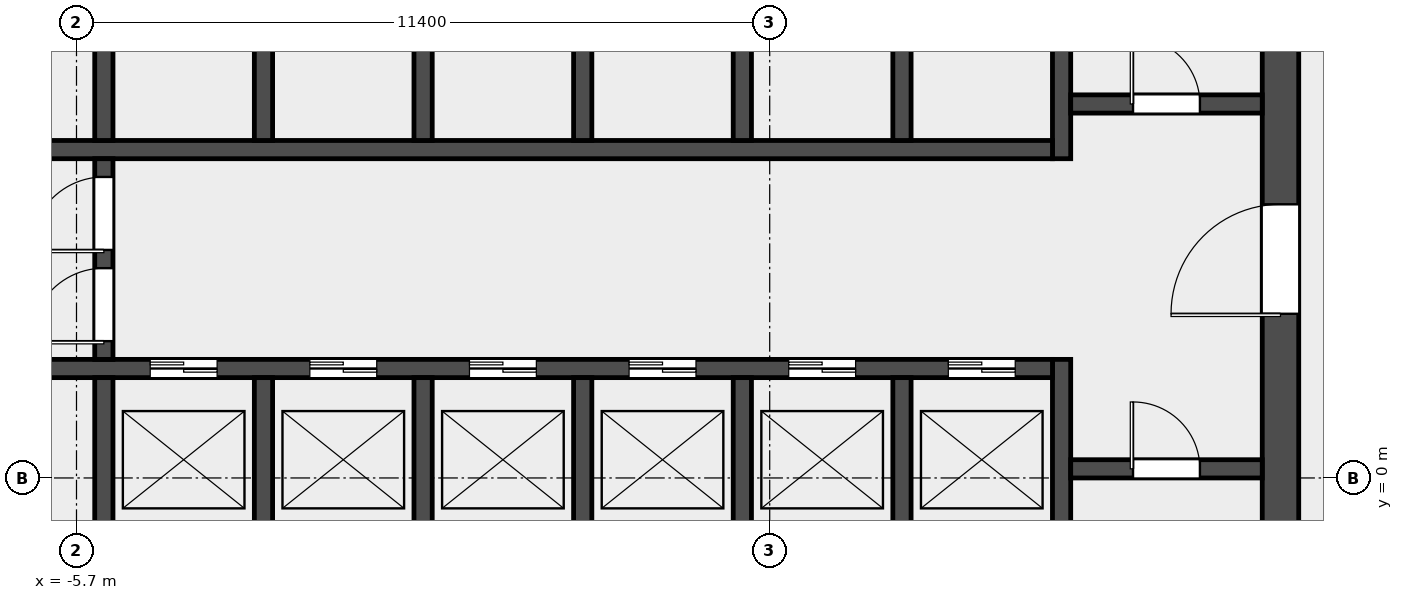
"""IFC4 building model, lengths in metres.
Left out: names, types, materials, properties, quantities, classifications, styles, units other than length and angle.
Written with IfcOpenShell. Run it as: python <this file> out.ifc"""

import sys

from ifc_helpers import new_model, si_unit, direction, frame, frame_2d, origin, place, context, subcontext, project, spatial, rectangle, extrude, element, fill, save


model = new_model("IFC4")
c1 = context("Model", 3, precision=1e-05, world=origin(), true_north=direction((0.0, 1.0)))
c2 = subcontext(c1, "Body", "Model", "MODEL_VIEW")
j1 = project(units=[si_unit("LENGTHUNIT", "METRE"), si_unit("PLANEANGLEUNIT", "RADIAN")], contexts=[c1])
p1 = place(None, origin())
s1 = spatial("IfcSite", under=j1, at=p1, CompositionType="ELEMENT")
p2 = place(p1, origin())
s2 = spatial("IfcBuilding", under=s1, at=p2, CompositionType="ELEMENT")
p3 = place(p2, frame((0.0, 0.0, 79.0)))
s3 = spatial("IfcBuildingStorey", under=s2, at=p3, CompositionType="ELEMENT", Elevation=79.0)
p4 = place(p3, frame((14.1, -6.6, 0.0), z_axis=(0.0, 0.0, 1.0), x_axis=(0.0, 1.0, 0.0)))
e1 = element("IfcWall", 1, at=p4, inside=s3, PredefinedType="SHEAR", context=c2, shape_type="SweptSolid", body=[
    extrude(rectangle(XDim=19.5, YDim=0.6, at=frame_2d((9.75, 0.0))), origin(), (0.0, 0.0, 1.0), 4.5),
])
p5 = place(p4, frame((9.3, 0.0, 0.0)))
e2 = element("IfcOpeningElement", 2, at=p5, cuts=e1, PredefinedType="OPENING", context=c2, shape_type="SweptSolid", body=[
    extrude(rectangle(XDim=1.8, YDim=2.1, at=frame_2d((0.9, 1.05))), frame((0.0, 0.312, 0.0), z_axis=(0.0, -1.0, 0.0), x_axis=(1.0, 0.0, 0.0)), (0.0, 0.0, 1.0), 0.624),
])
p6 = place(p3, frame((10.5, -6.6, 0.0), z_axis=(0.0, 0.0, 1.0), x_axis=(0.0, 1.0, 0.0)))
e3 = element("IfcWall", 3, at=p6, inside=s3, PredefinedType="SHEAR", context=c2, shape_type="SweptSolid", body=[
    extrude(rectangle(XDim=8.55, YDim=0.3, at=frame_2d((4.275, 0.0))), origin(), (0.0, 0.0, 1.0), 4.5),
])
p7 = place(p3, frame((10.5, 5.25, 0.0), z_axis=(0.0, 0.0, 1.0), x_axis=(0.0, 1.0, 0.0)))
e4 = element("IfcWall", 4, at=p7, inside=s3, PredefinedType="SHEAR", context=c2, shape_type="SweptSolid", body=[
    extrude(rectangle(XDim=7.65, YDim=0.3, at=frame_2d((3.825, 0.0))), origin(), (0.0, 0.0, 1.0), 4.5),
])
p8 = place(p3, frame((10.65, 0.15, 0.0), z_axis=(0.0, 0.0, 1.0), x_axis=(1.0, 0.0, 0.0)))
e5 = element("IfcWall", 5, at=p8, inside=s3, PredefinedType="SOLIDWALL", context=c2, shape_type="SweptSolid", body=[
    extrude(rectangle(XDim=3.15, YDim=0.3, at=frame_2d((1.575, 0.0))), origin(), (0.0, 0.0, 1.0), 4.5),
])
p9 = place(p8, frame((1.025, 0.0, 0.0)))
e6 = element("IfcOpeningElement", 6, at=p9, cuts=e5, PredefinedType="OPENING", context=c2, shape_type="SweptSolid", body=[
    extrude(rectangle(XDim=1.1, YDim=2.1, at=frame_2d((0.55, 1.05))), frame((0.0, 0.162, 0.0), z_axis=(0.0, -1.0, 0.0), x_axis=(1.0, 0.0, 0.0)), (0.0, 0.0, 1.0), 0.324),
])
p10 = place(p3, frame((10.65, 6.15, 0.0), z_axis=(0.0, 0.0, 1.0), x_axis=(1.0, 0.0, 0.0)))
e7 = element("IfcWall", 7, at=p10, inside=s3, PredefinedType="SOLIDWALL", context=c2, shape_type="SweptSolid", body=[
    extrude(rectangle(XDim=3.15, YDim=0.3, at=frame_2d((1.575, 0.0))), origin(), (0.0, 0.0, 1.0), 4.5),
])
p11 = place(p10, frame((1.025, 0.0, 0.0)))
e8 = element("IfcOpeningElement", 8, at=p11, cuts=e7, PredefinedType="OPENING", context=c2, shape_type="SweptSolid", body=[
    extrude(rectangle(XDim=1.1, YDim=2.1, at=frame_2d((0.55, 1.05))), frame((0.0, 0.162, 0.0), z_axis=(0.0, -1.0, 0.0), x_axis=(1.0, 0.0, 0.0)), (0.0, 0.0, 1.0), 0.324),
])
p12 = place(p3, frame((-10.35, 1.8, 0.0), z_axis=(0.0, 0.0, 1.0), x_axis=(1.0, 0.0, 0.0)))
e9 = element("IfcWall", 9, at=p12, inside=s3, PredefinedType="SOLIDWALL", context=c2, shape_type="SweptSolid", body=[
    extrude(rectangle(XDim=20.7, YDim=0.3, at=frame_2d((10.35, 0.0))), origin(), (0.0, 0.0, 1.0), 4.5),
])
p13 = place(p12, frame((0.512, 0.0, 0.0)))
e10 = element("IfcOpeningElement", 10, at=p13, cuts=e9, PredefinedType="OPENING", context=c2, shape_type="SweptSolid", body=[
    extrude(rectangle(XDim=1.3, YDim=2.1, at=frame_2d((0.65, 1.05))), frame((0.0, 0.162, 0.0), z_axis=(0.0, -1.0, 0.0), x_axis=(1.0, 0.0, 0.0)), (0.0, 0.0, 1.0), 0.324),
])
p14 = place(p12, frame((5.863, 0.0, 0.0)))
e11 = element("IfcOpeningElement", 11, at=p14, cuts=e9, PredefinedType="OPENING", context=c2, shape_type="SweptSolid", body=[
    extrude(rectangle(XDim=1.1, YDim=2.1, at=frame_2d((0.55, 1.05))), frame((0.0, 0.162, 0.0), z_axis=(0.0, -1.0, 0.0), x_axis=(1.0, 0.0, 0.0)), (0.0, 0.0, 1.0), 0.324),
])
p15 = place(p12, frame((8.488, 0.0, 0.0)))
e12 = element("IfcOpeningElement", 12, at=p15, cuts=e9, PredefinedType="OPENING", context=c2, shape_type="SweptSolid", body=[
    extrude(rectangle(XDim=1.1, YDim=2.1, at=frame_2d((0.55, 1.05))), frame((0.0, 0.162, 0.0), z_axis=(0.0, -1.0, 0.0), x_axis=(1.0, 0.0, 0.0)), (0.0, 0.0, 1.0), 0.324),
])
p16 = place(p12, frame((11.113, 0.0, 0.0)))
e13 = element("IfcOpeningElement", 13, at=p16, cuts=e9, PredefinedType="OPENING", context=c2, shape_type="SweptSolid", body=[
    extrude(rectangle(XDim=1.1, YDim=2.1, at=frame_2d((0.55, 1.05))), frame((0.0, 0.162, 0.0), z_axis=(0.0, -1.0, 0.0), x_axis=(1.0, 0.0, 0.0)), (0.0, 0.0, 1.0), 0.324),
])
p17 = place(p12, frame((13.738, 0.0, 0.0)))
e14 = element("IfcOpeningElement", 14, at=p17, cuts=e9, PredefinedType="OPENING", context=c2, shape_type="SweptSolid", body=[
    extrude(rectangle(XDim=1.1, YDim=2.1, at=frame_2d((0.55, 1.05))), frame((0.0, 0.162, 0.0), z_axis=(0.0, -1.0, 0.0), x_axis=(1.0, 0.0, 0.0)), (0.0, 0.0, 1.0), 0.324),
])
p18 = place(p12, frame((16.363, 0.0, 0.0)))
e15 = element("IfcOpeningElement", 15, at=p18, cuts=e9, PredefinedType="OPENING", context=c2, shape_type="SweptSolid", body=[
    extrude(rectangle(XDim=1.1, YDim=2.1, at=frame_2d((0.55, 1.05))), frame((0.0, 0.162, 0.0), z_axis=(0.0, -1.0, 0.0), x_axis=(1.0, 0.0, 0.0)), (0.0, 0.0, 1.0), 0.324),
])
p19 = place(p12, frame((18.988, 0.0, 0.0)))
e16 = element("IfcOpeningElement", 16, at=p19, cuts=e9, PredefinedType="OPENING", context=c2, shape_type="SweptSolid", body=[
    extrude(rectangle(XDim=1.1, YDim=2.1, at=frame_2d((0.55, 1.05))), frame((0.0, 0.162, 0.0), z_axis=(0.0, -1.0, 0.0), x_axis=(1.0, 0.0, 0.0)), (0.0, 0.0, 1.0), 0.324),
])
p20 = place(p3, frame((-10.35, 5.4, 0.0), z_axis=(0.0, 0.0, 1.0), x_axis=(1.0, 0.0, 0.0)))
e17 = element("IfcWall", 17, at=p20, inside=s3, PredefinedType="SOLIDWALL", context=c2, shape_type="SweptSolid", body=[
    extrude(rectangle(XDim=20.7, YDim=0.3, at=frame_2d((10.35, 0.0))), origin(), (0.0, 0.0, 1.0), 4.5),
])
p21 = place(p20, frame((0.512, 0.0, 0.0)))
e18 = element("IfcOpeningElement", 18, at=p21, cuts=e17, PredefinedType="OPENING", context=c2, shape_type="SweptSolid", body=[
    extrude(rectangle(XDim=1.3, YDim=2.1, at=frame_2d((0.65, 1.05))), frame((0.0, 0.162, 0.0), z_axis=(0.0, -1.0, 0.0), x_axis=(1.0, 0.0, 0.0)), (0.0, 0.0, 1.0), 0.324),
])
for number, where, z_axis, x_axis in (
    (19, (-5.25, -1.05, 0.0), (0.0, 0.0, 1.0), (0.0, 1.0, 0.0)),
    (20, (-2.625, -1.05, 0.0), (0.0, 0.0, 1.0), (0.0, 1.0, 0.0)),
    (21, (0.0, -1.05, 0.0), (0.0, 0.0, 1.0), (0.0, 1.0, 0.0)),
    (22, (2.625, -1.05, 0.0), (0.0, 0.0, 1.0), (0.0, 1.0, 0.0)),
    (23, (5.25, -1.05, 0.0), (0.0, 0.0, 1.0), (0.0, 1.0, 0.0)),
    (24, (7.875, -1.05, 0.0), (0.0, 0.0, 1.0), (0.0, 1.0, 0.0)),
    (25, (-5.25, 5.55, 0.0), (0.0, 0.0, 1.0), (0.0, 1.0, 0.0)),
    (26, (-2.625, 5.55, 0.0), (0.0, 0.0, 1.0), (0.0, 1.0, 0.0)),
    (27, (0.0, 5.55, 0.0), (0.0, 0.0, 1.0), (0.0, 1.0, 0.0)),
    (28, (2.625, 5.55, 0.0), (0.0, 0.0, 1.0), (0.0, 1.0, 0.0)),
    (29, (5.25, 5.55, 0.0), (0.0, 0.0, 1.0), (0.0, 1.0, 0.0)),
    (30, (7.875, 5.55, 0.0), (0.0, 0.0, 1.0), (0.0, 1.0, 0.0)),
):
    element("IfcWall", number, at=place(p3, frame(where, z_axis=z_axis, x_axis=x_axis)), inside=s3, PredefinedType="SOLIDWALL", context=c2, shape_type="SweptSolid", body=[
        extrude(rectangle(XDim=2.7, YDim=0.3, at=frame_2d((1.35, 0.0))), origin(), (0.0, 0.0, 1.0), 4.5),
    ])
p22 = place(p3, frame((-5.25, 1.95, 0.0), z_axis=(0.0, 0.0, 1.0), x_axis=(0.0, 1.0, 0.0)))
e31 = element("IfcWall", 31, at=p22, inside=s3, PredefinedType="SOLIDWALL", context=c2, shape_type="SweptSolid", body=[
    extrude(rectangle(XDim=3.3, YDim=0.3, at=frame_2d((1.65, 0.0))), origin(), (0.0, 0.0, 1.0), 4.5),
])
p23 = place(p22, frame((0.3, 0.0, 0.0)))
e32 = element("IfcOpeningElement", 32, at=p23, cuts=e31, PredefinedType="OPENING", context=c2, shape_type="SweptSolid", body=[
    extrude(rectangle(XDim=1.2, YDim=2.1, at=frame_2d((0.6, 1.05))), frame((0.0, 0.162, 0.0), z_axis=(0.0, -1.0, 0.0), x_axis=(1.0, 0.0, 0.0)), (0.0, 0.0, 1.0), 0.324),
])
p24 = place(p22, frame((1.8, 0.0, 0.0)))
e33 = element("IfcOpeningElement", 33, at=p24, cuts=e31, PredefinedType="OPENING", context=c2, shape_type="SweptSolid", body=[
    extrude(rectangle(XDim=1.2, YDim=2.1, at=frame_2d((0.6, 1.05))), frame((0.0, 0.162, 0.0), z_axis=(0.0, -1.0, 0.0), x_axis=(1.0, 0.0, 0.0)), (0.0, 0.0, 1.0), 0.324),
])
p25 = place(p9, origin())
e34 = element("IfcDoor", 34, at=p25, inside=s3, OperationType="SINGLE_SWING_RIGHT", PredefinedType="DOOR", context=c2, shape_type="SweptSolid", body=[
    extrude(rectangle(XDim=1.1, YDim=2.1, at=frame_2d((0.55, 1.05))), frame((0.0, 0.025, 0.0), z_axis=(0.0, -1.0, 0.0), x_axis=(1.0, 0.0, 0.0)), (0.0, 0.0, 1.0), 0.05),
])
fill(e6, e34)
p26 = place(p11, origin())
e35 = element("IfcDoor", 35, at=p26, inside=s3, OperationType="SINGLE_SWING_RIGHT", PredefinedType="DOOR", context=c2, shape_type="SweptSolid", body=[
    extrude(rectangle(XDim=1.1, YDim=2.1, at=frame_2d((0.55, 1.05))), frame((0.0, 0.025, 0.0), z_axis=(0.0, -1.0, 0.0), x_axis=(1.0, 0.0, 0.0)), (0.0, 0.0, 1.0), 0.05),
])
fill(e8, e35)
p27 = place(p5, origin())
e36 = element("IfcDoor", 36, at=p27, inside=s3, OperationType="DOUBLE_DOOR_SINGLE_SWING", PredefinedType="DOOR", context=c2, shape_type="SweptSolid", body=[
    extrude(rectangle(XDim=1.8, YDim=2.1, at=frame_2d((0.9, 1.05))), frame((0.0, 0.025, 0.0), z_axis=(0.0, -1.0, 0.0), x_axis=(1.0, 0.0, 0.0)), (0.0, 0.0, 1.0), 0.05),
])
fill(e2, e36)
p28 = place(p23, origin())
e37 = element("IfcDoor", 37, at=p28, inside=s3, OperationType="SINGLE_SWING_LEFT", PredefinedType="DOOR", context=c2, shape_type="SweptSolid", body=[
    extrude(rectangle(XDim=1.2, YDim=2.1, at=frame_2d((0.6, 1.05))), frame((0.0, 0.025, 0.0), z_axis=(0.0, -1.0, 0.0), x_axis=(1.0, 0.0, 0.0)), (0.0, 0.0, 1.0), 0.05),
])
fill(e32, e37)
p29 = place(p24, origin())
e38 = element("IfcDoor", 38, at=p29, inside=s3, OperationType="SINGLE_SWING_RIGHT", PredefinedType="DOOR", context=c2, shape_type="SweptSolid", body=[
    extrude(rectangle(XDim=1.2, YDim=2.1, at=frame_2d((0.6, 1.05))), frame((0.0, 0.025, 0.0), z_axis=(0.0, -1.0, 0.0), x_axis=(1.0, 0.0, 0.0)), (0.0, 0.0, 1.0), 0.05),
])
fill(e33, e38)
p30 = place(p14, origin())
e39 = element("IfcDoor", 39, at=p30, inside=s3, OperationType="DOUBLE_DOOR_SLIDING", PredefinedType="DOOR", context=c2, shape_type="SweptSolid", body=[
    extrude(rectangle(XDim=1.1, YDim=2.1, at=frame_2d((0.55, 1.05))), frame((0.0, 0.025, 0.0), z_axis=(0.0, -1.0, 0.0), x_axis=(1.0, 0.0, 0.0)), (0.0, 0.0, 1.0), 0.05),
])
fill(e11, e39)
p31 = place(p15, origin())
e40 = element("IfcDoor", 40, at=p31, inside=s3, OperationType="DOUBLE_DOOR_SLIDING", PredefinedType="DOOR", context=c2, shape_type="SweptSolid", body=[
    extrude(rectangle(XDim=1.1, YDim=2.1, at=frame_2d((0.55, 1.05))), frame((0.0, 0.025, 0.0), z_axis=(0.0, -1.0, 0.0), x_axis=(1.0, 0.0, 0.0)), (0.0, 0.0, 1.0), 0.05),
])
fill(e12, e40)
p32 = place(p16, origin())
e41 = element("IfcDoor", 41, at=p32, inside=s3, OperationType="DOUBLE_DOOR_SLIDING", PredefinedType="DOOR", context=c2, shape_type="SweptSolid", body=[
    extrude(rectangle(XDim=1.1, YDim=2.1, at=frame_2d((0.55, 1.05))), frame((0.0, 0.025, 0.0), z_axis=(0.0, -1.0, 0.0), x_axis=(1.0, 0.0, 0.0)), (0.0, 0.0, 1.0), 0.05),
])
fill(e13, e41)
p33 = place(p17, origin())
e42 = element("IfcDoor", 42, at=p33, inside=s3, OperationType="DOUBLE_DOOR_SLIDING", PredefinedType="DOOR", context=c2, shape_type="SweptSolid", body=[
    extrude(rectangle(XDim=1.1, YDim=2.1, at=frame_2d((0.55, 1.05))), frame((0.0, 0.025, 0.0), z_axis=(0.0, -1.0, 0.0), x_axis=(1.0, 0.0, 0.0)), (0.0, 0.0, 1.0), 0.05),
])
fill(e14, e42)
p34 = place(p18, origin())
e43 = element("IfcDoor", 43, at=p34, inside=s3, OperationType="DOUBLE_DOOR_SLIDING", PredefinedType="DOOR", context=c2, shape_type="SweptSolid", body=[
    extrude(rectangle(XDim=1.1, YDim=2.1, at=frame_2d((0.55, 1.05))), frame((0.0, 0.025, 0.0), z_axis=(0.0, -1.0, 0.0), x_axis=(1.0, 0.0, 0.0)), (0.0, 0.0, 1.0), 0.05),
])
fill(e15, e43)
p35 = place(p19, origin())
e44 = element("IfcDoor", 44, at=p35, inside=s3, OperationType="DOUBLE_DOOR_SLIDING", PredefinedType="DOOR", context=c2, shape_type="SweptSolid", body=[
    extrude(rectangle(XDim=1.1, YDim=2.1, at=frame_2d((0.55, 1.05))), frame((0.0, 0.025, 0.0), z_axis=(0.0, -1.0, 0.0), x_axis=(1.0, 0.0, 0.0)), (0.0, 0.0, 1.0), 0.05),
])
fill(e16, e44)
save(model, sys.argv[1])
